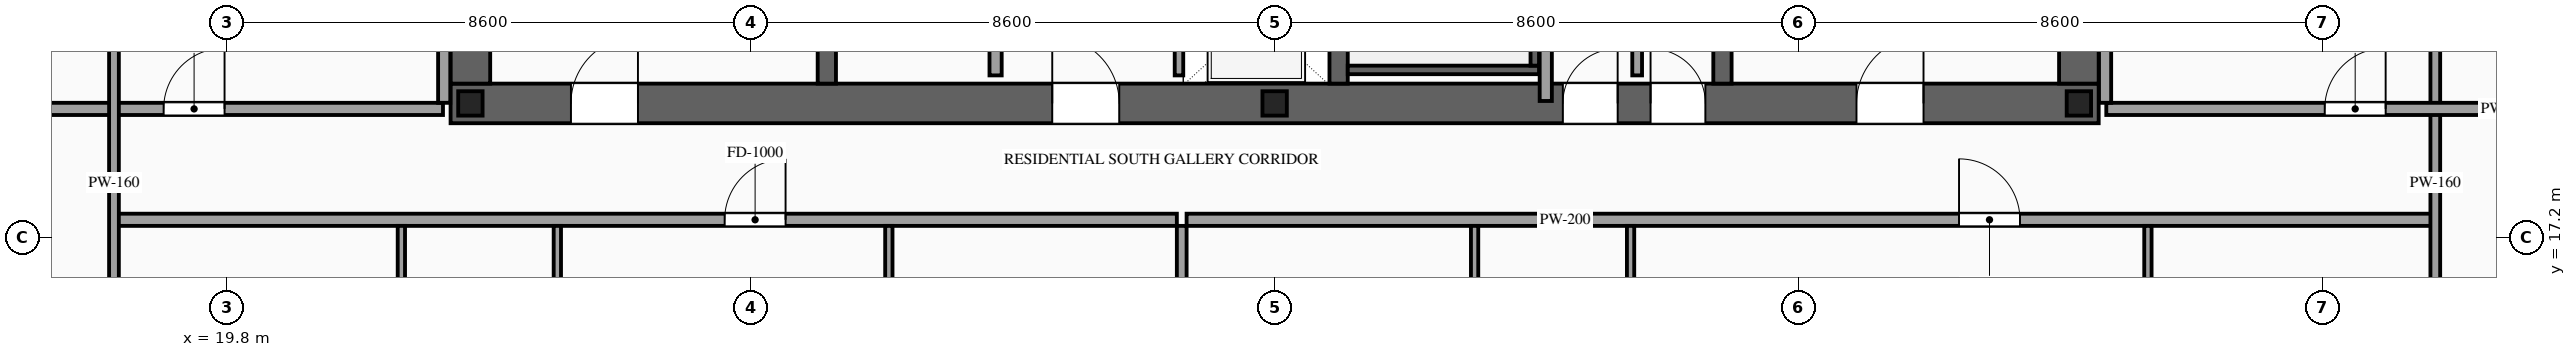
"""IFC4 building model, lengths in metres.
Left out: names, types, materials, properties, quantities, classifications, styles, units other than length and angle.
Written with IfcOpenShell. Run it as: python <this file> out.ifc"""

import sys

from ifc_helpers import new_model, si_unit, direction, frame, frame_2d, origin, origin_2d, place, context, subcontext, project, spatial, rectangle, i_section, extrude, source, transform, mapped, element, fill, save


model = new_model("IFC4")
c1 = context("Model", 3, precision=1e-05, world=origin(), true_north=direction((0.0, 1.0)))
c2 = subcontext(c1, "Body", "Model", "MODEL_VIEW")
j1 = project(units=[si_unit("LENGTHUNIT", "METRE"), si_unit("PLANEANGLEUNIT", "RADIAN")], contexts=[c1])
p1 = place(None, origin())
s1 = spatial("IfcSite", under=j1, at=p1, CompositionType="ELEMENT")
p2 = place(p1, origin())
s2 = spatial("IfcBuilding", under=s1, at=p2, CompositionType="ELEMENT")
p3 = place(p2, frame((0.0, 0.0, 212.5)))
s3 = spatial("IfcBuildingStorey", under=s2, at=p3, CompositionType="ELEMENT", Elevation=212.5)
p4 = place(p3, frame((23.475, 19.4, 0.0), z_axis=(0.0, 0.0, 1.0), x_axis=(1.0, 0.0, 0.0)))
e1 = element("IfcWall", 1, at=p4, inside=s3, PredefinedType="SHEAR", context=c2, shape_type="SweptSolid", body=[
    extrude(rectangle(XDim=27.05, YDim=0.65, at=frame_2d((13.525, 0.0))), origin(), (0.0, 0.0, 1.0), 3.5),
])
p5 = place(p4, frame((1.975, 0.0, 0.0)))
e2 = element("IfcOpeningElement", 2, at=p5, cuts=e1, PredefinedType="OPENING", context=c2, shape_type="SweptSolid", body=[
    extrude(rectangle(XDim=1.1, YDim=2.2, at=frame_2d((0.55, 1.1))), frame((0.0, 0.34, 0.0), z_axis=(0.0, -1.0, 0.0), x_axis=(1.0, 0.0, 0.0)), (0.0, 0.0, 1.0), 0.68),
])
p6 = place(p4, frame((9.875, 0.0, 0.0)))
e3 = element("IfcOpeningElement", 3, at=p6, cuts=e1, PredefinedType="OPENING", context=c2, shape_type="SweptSolid", body=[
    extrude(rectangle(XDim=1.1, YDim=2.2, at=frame_2d((0.55, 1.1))), frame((0.0, 0.34, 0.0), z_axis=(0.0, -1.0, 0.0), x_axis=(1.0, 0.0, 0.0)), (0.0, 0.0, 1.0), 0.68),
])
p7 = place(p4, frame((23.075, 0.0, 0.0)))
e4 = element("IfcOpeningElement", 4, at=p7, cuts=e1, PredefinedType="OPENING", context=c2, shape_type="SweptSolid", body=[
    extrude(rectangle(XDim=1.1, YDim=2.2, at=frame_2d((0.55, 1.1))), frame((0.0, 0.34, 0.0), z_axis=(0.0, -1.0, 0.0), x_axis=(1.0, 0.0, 0.0)), (0.0, 0.0, 1.0), 0.68),
])
p8 = place(p4, frame((19.695, 0.0, 0.0)))
e5 = element("IfcOpeningElement", 5, at=p8, cuts=e1, PredefinedType="OPENING", context=c2, shape_type="SweptSolid", body=[
    extrude(rectangle(XDim=0.9, YDim=2.15, at=frame_2d((0.45, 1.075))), frame((0.0, 0.34, 0.0), z_axis=(0.0, -1.0, 0.0), x_axis=(1.0, 0.0, 0.0)), (0.0, 0.0, 1.0), 0.68),
])
p9 = place(p4, frame((18.255, 0.0, 0.0)))
e6 = element("IfcOpeningElement", 6, at=p9, cuts=e1, PredefinedType="OPENING", context=c2, shape_type="SweptSolid", body=[
    extrude(rectangle(XDim=0.9, YDim=2.15, at=frame_2d((0.45, 1.075))), frame((0.0, 0.34, 0.0), z_axis=(0.0, -1.0, 0.0), x_axis=(1.0, 0.0, 0.0)), (0.0, 0.0, 1.0), 0.68),
])
m1 = source(origin(), c2, "Body", "SweptSolid", [
    extrude(rectangle(XDim=12.15, YDim=0.65, at=frame_2d((6.075, 0.0))), origin(), (0.0, 0.0, 1.0), 3.5),
])
for number, where, z_axis, x_axis in (
    (7, (23.8, 19.725, 0.0), (0.0, 0.0, 1.0), (0.0, 1.0, 0.0)),
    (8, (50.2, 19.725, 0.0), (0.0, 0.0, 1.0), (0.0, 1.0, 0.0)),
):
    element("IfcWall", number, at=place(p3, frame(where, z_axis=z_axis, x_axis=x_axis)), inside=s3, PredefinedType="SHEAR", context=c2, shape_type="MappedRepresentation", body=[
        mapped(m1, transform((0.0, 0.0, 0.0), scale=1.0)),
    ])
m2 = source(origin(), c2, "Body", "SweptSolid", [
    extrude(rectangle(XDim=12.15, YDim=0.3, at=frame_2d((6.075, 0.0))), origin(), (0.0, 0.0, 1.0), 3.5),
])
for number, where, z_axis, x_axis in (
    (9, (29.65, 19.725, 0.0), (0.0, 0.0, 1.0), (0.0, 1.0, 0.0)),
    (10, (38.05, 19.725, 0.0), (0.0, 0.0, 1.0), (0.0, 1.0, 0.0)),
    (11, (44.35, 19.725, 0.0), (0.0, 0.0, 1.0), (0.0, 1.0, 0.0)),
):
    element("IfcWall", number, at=place(p3, frame(where, z_axis=z_axis, x_axis=x_axis)), inside=s3, PredefinedType="SOLIDWALL", context=c2, shape_type="MappedRepresentation", body=[
        mapped(m2, transform((0.0, 0.0, 0.0), scale=1.0)),
    ])
m3 = source(origin(), c2, "Body", "SweptSolid", [
    extrude(i_section(OverallWidth=0.4, OverallDepth=0.4, WebThickness=0.013, FlangeThickness=0.021, at=origin_2d()), origin(), (0.0, 0.0, 1.0), 3.5),
])
for number, where, z_axis, x_axis in (
    (12, (23.8, 19.4, 0.0), (0.0, 0.0, 1.0), (1.0, 0.0, 0.0)),
    (13, (37.0, 19.4, 0.0), (0.0, 0.0, 1.0), (1.0, 0.0, 0.0)),
    (14, (50.2, 19.4, 0.0), (0.0, 0.0, 1.0), (1.0, 0.0, 0.0)),
):
    element("IfcColumn", number, at=place(p3, frame(where, z_axis=z_axis, x_axis=x_axis)), inside=s3, PredefinedType="COLUMN", context=c2, shape_type="MappedRepresentation", body=[
        mapped(m3, transform((0.0, 0.0, 0.0), scale=1.0)),
    ])
p10 = place(p3, frame((35.43, 19.86, 0.0), z_axis=(0.0, 0.0, 1.0), x_axis=(0.0, 1.0, 0.0)))
e15 = element("IfcWall", 15, at=p10, inside=s3, PredefinedType="SOLIDWALL", context=c2, shape_type="SweptSolid", body=[
    extrude(rectangle(XDim=2.04, YDim=0.14, at=frame_2d((1.02, 0.0))), origin(), (0.0, 0.0, 1.0), 3.28),
])
p11 = place(p10, frame((0.47, 0.0, 0.0)))
e16 = element("IfcOpeningElement", 16, at=p11, cuts=e15, PredefinedType="OPENING", context=c2, shape_type="SweptSolid", body=[
    extrude(rectangle(XDim=1.1, YDim=2.2, at=frame_2d((0.55, 1.1))), frame((0.0, 0.085, 0.0), z_axis=(0.0, -1.0, 0.0), x_axis=(1.0, 0.0, 0.0)), (0.0, 0.0, 1.0), 0.17),
])
m4 = source(origin(), c2, "Body", "SweptSolid", [
    extrude(rectangle(XDim=3.14, YDim=0.14, at=frame_2d((1.57, 0.0))), origin(), (0.0, 0.0, 1.0), 3.28),
])
p12 = place(p3, frame((38.2, 19.95, 0.0), z_axis=(0.0, 0.0, 1.0), x_axis=(1.0, 0.0, 0.0)))
e17 = element("IfcWall", 17, at=p12, inside=s3, PredefinedType="SOLIDWALL", context=c2, shape_type="MappedRepresentation", body=[
    mapped(m4, transform((0.0, 0.0, 0.0), scale=1.0)),
])
m5 = source(origin(), c2, "Body", "SweptSolid", [
    extrude(rectangle(XDim=8.94, YDim=0.14, at=frame_2d((4.47, 0.0))), origin(), (0.0, 0.0, 1.0), 3.28),
])
p13 = place(p3, frame((41.27, 20.02, 0.0), z_axis=(0.0, 0.0, 1.0), x_axis=(0.0, 1.0, 0.0)))
e18 = element("IfcWall", 18, at=p13, inside=s3, PredefinedType="SOLIDWALL", context=c2, shape_type="MappedRepresentation", body=[
    mapped(m5, transform((0.0, 0.0, 0.0), scale=1.0)),
])
p14 = place(p3, frame((32.42, 19.86, 0.0), z_axis=(0.0, 0.0, 1.0), x_axis=(0.0, 1.0, 0.0)))
e19 = element("IfcWall", 19, at=p14, inside=s3, PredefinedType="PARTITIONING", context=c2, shape_type="SweptSolid", body=[
    extrude(rectangle(XDim=3.94, YDim=0.2, at=frame_2d((1.97, 0.0))), origin(), (0.0, 0.0, 1.0), 3.28),
])
p15 = place(p14, frame((1.52, 0.0, 0.0)))
e20 = element("IfcOpeningElement", 20, at=p15, cuts=e19, PredefinedType="OPENING", context=c2, shape_type="SweptSolid", body=[
    extrude(rectangle(XDim=0.9, YDim=2.15, at=frame_2d((0.45, 1.075))), frame((0.0, 0.115, 0.0), z_axis=(0.0, -1.0, 0.0), x_axis=(1.0, 0.0, 0.0)), (0.0, 0.0, 1.0), 0.23),
])
m6 = source(origin(), c2, "Body", "SweptSolid", [
    extrude(rectangle(XDim=1.34, YDim=0.16, at=frame_2d((0.67, 0.0))), origin(), (0.0, 0.0, 1.0), 3.28),
])
p16 = place(p3, frame((42.95, 19.86, 0.0), z_axis=(0.0, 0.0, 1.0), x_axis=(0.0, 1.0, 0.0)))
e21 = element("IfcWall", 21, at=p16, inside=s3, PredefinedType="PARTITIONING", context=c2, shape_type="MappedRepresentation", body=[
    mapped(m6, transform((0.0, 0.0, 0.0), scale=1.0)),
])
m7 = source(origin(), c2, "Body", "SweptSolid", [
    extrude(rectangle(XDim=6.51, YDim=0.2, at=frame_2d((3.255, 0.0))), origin(), (0.0, 0.0, 1.0), 3.28),
])
p17 = place(p3, frame((41.45, 19.44, 0.0), z_axis=(0.0, 0.0, 1.0), x_axis=(0.0, 1.0, 0.0)))
e22 = element("IfcWall", 22, at=p17, inside=s3, PredefinedType="PARTITIONING", context=c2, shape_type="MappedRepresentation", body=[
    mapped(m7, transform((0.0, 0.0, 0.0), scale=1.0)),
])
p18 = place(p3, frame((17.94, 17.49, 0.0), z_axis=(0.0, 0.0, 1.0), x_axis=(1.0, 0.0, 0.0)))
e23 = element("IfcWall", 23, at=p18, inside=s3, PredefinedType="PARTITIONING", context=c2, shape_type="SweptSolid", body=[
    extrude(rectangle(XDim=17.455, YDim=0.2, at=frame_2d((8.728, 0.0))), origin(), (0.0, 0.0, 1.0), 3.28),
])
p19 = place(p18, frame((10.033, 0.0, 0.0)))
e24 = element("IfcOpeningElement", 24, at=p19, cuts=e23, PredefinedType="OPENING", context=c2, shape_type="SweptSolid", body=[
    extrude(rectangle(XDim=1.0, YDim=2.2, at=frame_2d((0.5, 1.1))), frame((0.0, 0.115, 0.0), z_axis=(0.0, -1.0, 0.0), x_axis=(1.0, 0.0, 0.0)), (0.0, 0.0, 1.0), 0.23),
])
m8 = source(origin(), c2, "Body", "SweptSolid", [
    extrude(rectangle(XDim=13.54, YDim=0.16, at=frame_2d((6.77, 0.0))), origin(), (0.0, 0.0, 1.0), 3.28),
])
p20 = place(p3, frame((35.475, 3.85, 0.0), z_axis=(0.0, 0.0, 1.0), x_axis=(0.0, 1.0, 0.0)))
e25 = element("IfcWall", 25, at=p20, inside=s3, PredefinedType="PARTITIONING", context=c2, shape_type="MappedRepresentation", body=[
    mapped(m8, transform((0.0, 0.0, 0.0), scale=1.0)),
])
m9 = source(origin(), c2, "Body", "SweptSolid", [
    extrude(rectangle(XDim=5.61, YDim=0.12, at=frame_2d((2.805, 0.0))), origin(), (0.0, 0.0, 1.0), 3.28),
])
p21 = place(p3, frame((22.667, 11.78, 0.0), z_axis=(0.0, 0.0, 1.0), x_axis=(0.0, 1.0, 0.0)))
e26 = element("IfcWall", 26, at=p21, inside=s3, PredefinedType="PARTITIONING", context=c2, shape_type="MappedRepresentation", body=[
    mapped(m9, transform((0.0, 0.0, 0.0), scale=1.0)),
])
p22 = place(p3, frame((25.227, 11.78, 0.0), z_axis=(0.0, 0.0, 1.0), x_axis=(0.0, 1.0, 0.0)))
e27 = element("IfcWall", 27, at=p22, inside=s3, PredefinedType="PARTITIONING", context=c2, shape_type="SweptSolid", body=[
    extrude(rectangle(XDim=5.61, YDim=0.12, at=frame_2d((2.805, 0.0))), origin(), (0.0, 0.0, 1.0), 3.28),
])
p23 = place(p22, frame((2.38, 0.0, 0.0)))
e28 = element("IfcOpeningElement", 28, at=p23, cuts=e27, PredefinedType="OPENING", context=c2, shape_type="SweptSolid", body=[
    extrude(rectangle(XDim=0.85, YDim=2.1, at=frame_2d((0.425, 1.05))), frame((0.0, 0.075, 0.0), z_axis=(0.0, -1.0, 0.0), x_axis=(1.0, 0.0, 0.0)), (0.0, 0.0, 1.0), 0.15),
])
p24 = place(p3, frame((30.668, 11.78, 0.0), z_axis=(0.0, 0.0, 1.0), x_axis=(0.0, 1.0, 0.0)))
e29 = element("IfcWall", 29, at=p24, inside=s3, PredefinedType="PARTITIONING", context=c2, shape_type="MappedRepresentation", body=[
    mapped(m9, transform((0.0, 0.0, 0.0), scale=1.0)),
])
p25 = place(p3, frame((35.555, 17.49, 0.0), z_axis=(0.0, 0.0, 1.0), x_axis=(1.0, 0.0, 0.0)))
e30 = element("IfcWall", 30, at=p25, inside=s3, PredefinedType="PARTITIONING", context=c2, shape_type="SweptSolid", body=[
    extrude(rectangle(XDim=20.505, YDim=0.2, at=frame_2d((10.252, 0.0))), origin(), (0.0, 0.0, 1.0), 3.28),
])
p26 = place(p25, frame((12.678, 0.0, 0.0)))
e31 = element("IfcOpeningElement", 31, at=p26, cuts=e30, PredefinedType="OPENING", context=c2, shape_type="SweptSolid", body=[
    extrude(rectangle(XDim=1.0, YDim=2.2, at=frame_2d((0.5, 1.1))), frame((0.0, 0.115, 0.0), z_axis=(0.0, -1.0, 0.0), x_axis=(1.0, 0.0, 0.0)), (0.0, 0.0, 1.0), 0.23),
])
p27 = place(p3, frame((40.282, 11.78, 0.0), z_axis=(0.0, 0.0, 1.0), x_axis=(0.0, 1.0, 0.0)))
e32 = element("IfcWall", 32, at=p27, inside=s3, PredefinedType="PARTITIONING", context=c2, shape_type="MappedRepresentation", body=[
    mapped(m9, transform((0.0, 0.0, 0.0), scale=1.0)),
])
p28 = place(p3, frame((42.842, 11.78, 0.0), z_axis=(0.0, 0.0, 1.0), x_axis=(0.0, 1.0, 0.0)))
e33 = element("IfcWall", 33, at=p28, inside=s3, PredefinedType="PARTITIONING", context=c2, shape_type="SweptSolid", body=[
    extrude(rectangle(XDim=5.61, YDim=0.12, at=frame_2d((2.805, 0.0))), origin(), (0.0, 0.0, 1.0), 3.28),
])
p29 = place(p28, frame((2.38, 0.0, 0.0)))
e34 = element("IfcOpeningElement", 34, at=p29, cuts=e33, PredefinedType="OPENING", context=c2, shape_type="SweptSolid", body=[
    extrude(rectangle(XDim=0.85, YDim=2.1, at=frame_2d((0.425, 1.05))), frame((0.0, 0.075, 0.0), z_axis=(0.0, -1.0, 0.0), x_axis=(1.0, 0.0, 0.0)), (0.0, 0.0, 1.0), 0.15),
])
p30 = place(p3, frame((51.333, 11.78, 0.0), z_axis=(0.0, 0.0, 1.0), x_axis=(0.0, 1.0, 0.0)))
e35 = element("IfcWall", 35, at=p30, inside=s3, PredefinedType="PARTITIONING", context=c2, shape_type="MappedRepresentation", body=[
    mapped(m9, transform((0.0, 0.0, 0.0), scale=1.0)),
])
p31 = place(p3, frame((15.05, 19.31, 0.0), z_axis=(0.0, 0.0, 1.0), x_axis=(1.0, 0.0, 0.0)))
e36 = element("IfcWall", 36, at=p31, inside=s3, PredefinedType="PARTITIONING", context=c2, shape_type="SweptSolid", body=[
    extrude(rectangle(XDim=8.3, YDim=0.2, at=frame_2d((4.15, 0.0))), origin(), (0.0, 0.0, 1.0), 2.775),
])
p32 = place(p31, frame((3.715, 0.0, 0.0)))
e37 = element("IfcOpeningElement", 37, at=p32, cuts=e36, PredefinedType="OPENING", context=c2, shape_type="SweptSolid", body=[
    extrude(rectangle(XDim=1.0, YDim=2.2, at=frame_2d((0.5, 1.1))), frame((0.0, 0.115, 0.0), z_axis=(0.0, -1.0, 0.0), x_axis=(1.0, 0.0, 0.0)), (0.0, 0.0, 1.0), 0.23),
])
m10 = source(origin(), c2, "Body", "SweptSolid", [
    extrude(rectangle(XDim=6.29, YDim=0.2, at=frame_2d((3.145, 0.0))), origin(), (0.0, 0.0, 1.0), 3.28),
])
p33 = place(p3, frame((23.37, 19.41, 0.0), z_axis=(0.0, 0.0, 1.0), x_axis=(0.0, 1.0, 0.0)))
e38 = element("IfcWall", 38, at=p33, inside=s3, PredefinedType="PARTITIONING", context=c2, shape_type="MappedRepresentation", body=[
    mapped(m10, transform((0.0, 0.0, 0.0), scale=1.0)),
])
m11 = source(origin(), c2, "Body", "SweptSolid", [
    extrude(rectangle(XDim=28.19, YDim=0.16, at=frame_2d((14.095, 0.0))), origin(), (0.0, 0.0, 1.0), 3.28),
])
for number, where, z_axis, x_axis in (
    (39, (17.95, 4.0, 0.0), (0.0, 0.0, 1.0), (0.0, 1.0, 0.0)),
    (40, (56.05, 4.0, 0.0), (0.0, 0.0, 1.0), (0.0, 1.0, 0.0)),
):
    element("IfcWall", number, at=place(p3, frame(where, z_axis=z_axis, x_axis=x_axis)), inside=s3, PredefinedType="PARTITIONING", context=c2, shape_type="MappedRepresentation", body=[
        mapped(m11, transform((0.0, 0.0, 0.0), scale=1.0)),
    ])
p34 = place(p3, frame((50.65, 19.31, 0.0), z_axis=(0.0, 0.0, 1.0), x_axis=(1.0, 0.0, 0.0)))
e41 = element("IfcWall", 41, at=p34, inside=s3, PredefinedType="PARTITIONING", context=c2, shape_type="SweptSolid", body=[
    extrude(rectangle(XDim=8.3, YDim=0.2, at=frame_2d((4.15, 0.0))), origin(), (0.0, 0.0, 1.0), 2.775),
])
p35 = place(p34, frame((3.585, 0.0, 0.0)))
e42 = element("IfcOpeningElement", 42, at=p35, cuts=e41, PredefinedType="OPENING", context=c2, shape_type="SweptSolid", body=[
    extrude(rectangle(XDim=1.0, YDim=2.2, at=frame_2d((0.5, 1.1))), frame((0.0, 0.115, 0.0), z_axis=(0.0, -1.0, 0.0), x_axis=(1.0, 0.0, 0.0)), (0.0, 0.0, 1.0), 0.23),
])
p36 = place(p3, frame((50.63, 19.41, 0.0), z_axis=(0.0, 0.0, 1.0), x_axis=(0.0, 1.0, 0.0)))
e43 = element("IfcWall", 43, at=p36, inside=s3, PredefinedType="PARTITIONING", context=c2, shape_type="MappedRepresentation", body=[
    mapped(m10, transform((0.0, 0.0, 0.0), scale=1.0)),
])
m12 = source(origin(), c2, "Body", "SweptSolid", [
    extrude(rectangle(XDim=1.1, YDim=2.2, at=frame_2d((0.55, 1.1))), frame((0.0, 0.025, 0.0), z_axis=(0.0, -1.0, 0.0), x_axis=(1.0, 0.0, 0.0)), (0.0, 0.0, 1.0), 0.05),
])
p37 = place(p5, origin())
e44 = element("IfcDoor", 44, at=p37, inside=s3, OperationType="SINGLE_SWING_RIGHT", PredefinedType="DOOR", context=c2, shape_type="MappedRepresentation", body=[
    mapped(m12, transform((0.0, 0.0, 0.0), scale=1.0)),
])
fill(e2, e44)
p38 = place(p6, origin())
e45 = element("IfcDoor", 45, at=p38, inside=s3, OperationType="SINGLE_SWING_LEFT", PredefinedType="DOOR", context=c2, shape_type="MappedRepresentation", body=[
    mapped(m12, transform((0.0, 0.0, 0.0), scale=1.0)),
])
fill(e3, e45)
p39 = place(p7, origin())
e46 = element("IfcDoor", 46, at=p39, inside=s3, OperationType="SINGLE_SWING_RIGHT", PredefinedType="DOOR", context=c2, shape_type="MappedRepresentation", body=[
    mapped(m12, transform((0.0, 0.0, 0.0), scale=1.0)),
])
fill(e4, e46)
m13 = source(origin(), c2, "Body", "SweptSolid", [
    extrude(rectangle(XDim=0.9, YDim=2.15, at=frame_2d((0.45, 1.075))), frame((0.0, 0.025, 0.0), z_axis=(0.0, -1.0, 0.0), x_axis=(1.0, 0.0, 0.0)), (0.0, 0.0, 1.0), 0.05),
])
p40 = place(p8, origin())
e47 = element("IfcDoor", 47, at=p40, inside=s3, OperationType="SINGLE_SWING_LEFT", PredefinedType="DOOR", context=c2, shape_type="MappedRepresentation", body=[
    mapped(m13, transform((0.0, 0.0, 0.0), scale=1.0)),
])
fill(e5, e47)
p41 = place(p9, origin())
e48 = element("IfcDoor", 48, at=p41, inside=s3, OperationType="SINGLE_SWING_RIGHT", PredefinedType="DOOR", context=c2, shape_type="MappedRepresentation", body=[
    mapped(m13, transform((0.0, 0.0, 0.0), scale=1.0)),
])
fill(e6, e48)
m14 = source(origin(), c2, "Body", "SweptSolid", [
    extrude(rectangle(XDim=1.0, YDim=2.2, at=frame_2d((0.5, 1.1))), frame((0.0, 0.025, 0.0), z_axis=(0.0, -1.0, 0.0), x_axis=(1.0, 0.0, 0.0)), (0.0, 0.0, 1.0), 0.05),
])
p42 = place(p19, origin())
e49 = element("IfcDoor", 49, at=p42, inside=s3, OperationType="SINGLE_SWING_RIGHT", PredefinedType="DOOR", context=c2, shape_type="MappedRepresentation", body=[
    mapped(m14, transform((0.0, 0.0, 0.0), scale=1.0)),
])
fill(e24, e49)
p43 = place(p26, origin())
e50 = element("IfcDoor", 50, at=p43, inside=s3, OperationType="SINGLE_SWING_LEFT", PredefinedType="DOOR", context=c2, shape_type="MappedRepresentation", body=[
    mapped(m14, transform((0.0, 0.0, 0.0), scale=1.0)),
])
fill(e31, e50)
p44 = place(p32, origin())
e51 = element("IfcDoor", 51, at=p44, inside=s3, OperationType="SINGLE_SWING_RIGHT", PredefinedType="DOOR", context=c2, shape_type="MappedRepresentation", body=[
    mapped(m14, transform((0.0, 0.0, 0.0), scale=1.0)),
])
fill(e37, e51)
p45 = place(p35, origin())
e52 = element("IfcDoor", 52, at=p45, inside=s3, OperationType="SINGLE_SWING_RIGHT", PredefinedType="DOOR", context=c2, shape_type="MappedRepresentation", body=[
    mapped(m14, transform((0.0, 0.0, 0.0), scale=1.0)),
])
fill(e42, e52)
save(model, sys.argv[1])
